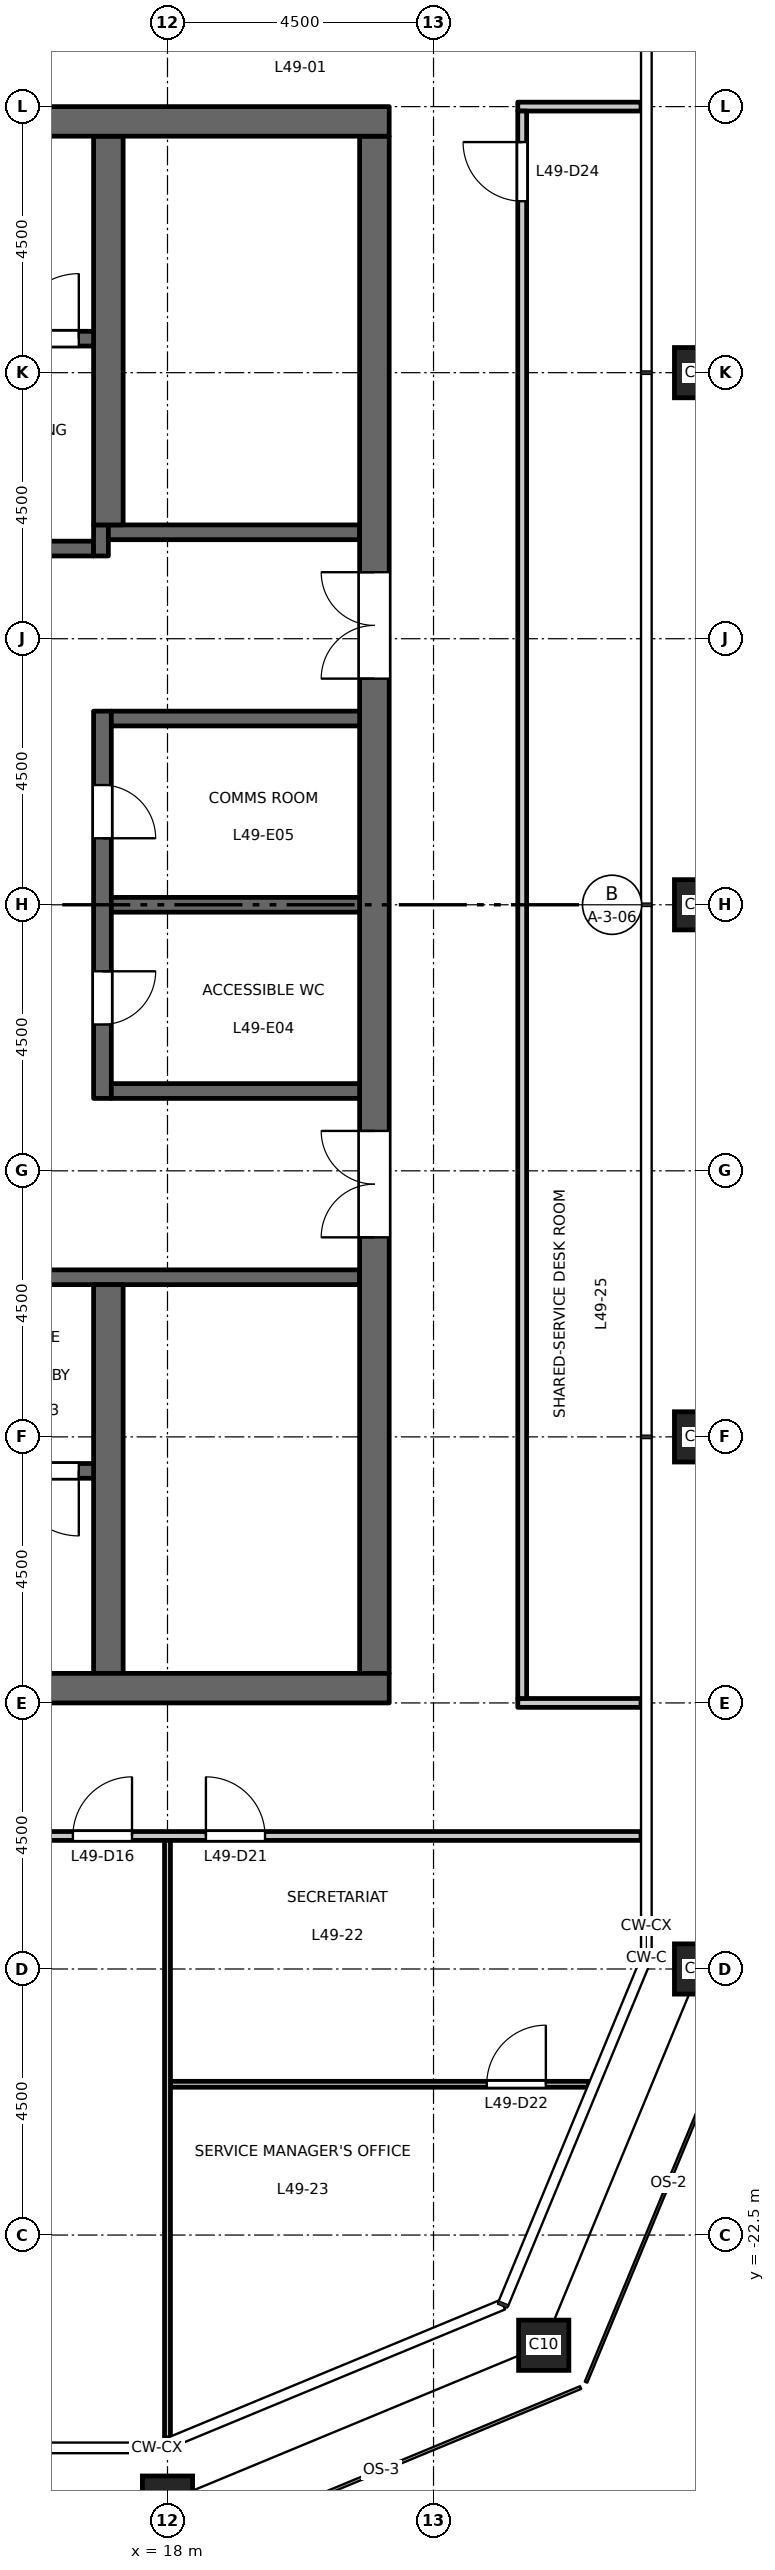
"""IFC4 building model, lengths in metres.
Left out: names, types, materials, properties, quantities, classifications, styles, units other than length and angle.
Written with IfcOpenShell. Run it as: python <this file> out.ifc"""

import sys

from ifc_helpers import new_model, si_unit, direction, frame, frame_2d, origin, origin_2d, place, context, subcontext, project, spatial, rectangle, hollow_rectangle, extrude, element, fill, save


model = new_model("IFC4")
c1 = context("Model", 3, precision=1e-05, world=origin(), true_north=direction((0.0, 1.0)))
c2 = subcontext(c1, "Body", "Model", "MODEL_VIEW")
j1 = project(units=[si_unit("LENGTHUNIT", "METRE"), si_unit("PLANEANGLEUNIT", "RADIAN")], contexts=[c1])
p1 = place(None, origin())
s1 = spatial("IfcSite", under=j1, at=p1, CompositionType="ELEMENT")
p2 = place(p1, origin())
s2 = spatial("IfcBuilding", under=s1, at=p2, CompositionType="ELEMENT")
p3 = place(p2, frame((0.0, 0.0, 228.7)))
s3 = spatial("IfcBuildingStorey", under=s2, at=p3, CompositionType="ELEMENT", Elevation=228.7)
for number, where, z_axis, x_axis in (
    (1, (18.0, -27.0, 0.0), (0.0, 0.0, 1.0), (1.0, 0.0, 0.0)),
    (2, (24.364, -24.364, 0.0), (0.0, 0.0, 1.0), (1.0, 0.0, 0.0)),
    (3, (27.0, -18.0, 0.0), (0.0, 0.0, 1.0), (1.0, 0.0, 0.0)),
    (4, (27.0, -9.0, 0.0), (0.0, 0.0, 1.0), (1.0, 0.0, 0.0)),
    (5, (27.0, 0.0, 0.0), (0.0, 0.0, 1.0), (1.0, 0.0, 0.0)),
    (6, (27.0, 9.0, 0.0), (0.0, 0.0, 1.0), (1.0, 0.0, 0.0)),
):
    element("IfcColumn", number, at=place(p3, frame(where, z_axis=z_axis, x_axis=x_axis)), inside=s3, PredefinedType="COLUMN", context=c2, shape_type="SweptSolid", body=[
        extrude(hollow_rectangle(XDim=0.85, YDim=0.85, WallThickness=0.05, at=origin_2d()), origin(), (0.0, 0.0, 1.0), 4.5),
    ])
p4 = place(p3, frame((12.15, 6.025, 0.0), z_axis=(0.0, 0.0, 1.0), x_axis=(1.0, 0.0, 0.0)))
e7 = element("IfcWall", 7, at=p4, inside=s3, PredefinedType="SHEAR", context=c2, shape_type="SweptSolid", body=[
    extrude(rectangle(XDim=4.6, YDim=0.25, at=frame_2d((2.3, 0.0))), origin(), (0.0, 0.0, 1.0), 4.35),
])
p5 = place(p4, frame((1.8, 0.0, 0.0)))
e8 = element("IfcOpeningElement", 8, at=p5, cuts=e7, PredefinedType="OPENING", context=c2, shape_type="SweptSolid", body=[
    extrude(rectangle(XDim=1.0, YDim=2.1, at=frame_2d((0.5, 1.05))), frame((0.0, 0.135, 0.0), z_axis=(0.0, -1.0, 0.0), x_axis=(1.0, 0.0, 0.0)), (0.0, 0.0, 1.0), 0.27),
])
p6 = place(p3, frame((16.875, 5.9, 0.0), z_axis=(0.0, 0.0, 1.0), x_axis=(0.0, 1.0, 0.0)))
e9 = element("IfcWall", 9, at=p6, inside=s3, PredefinedType="SHEAR", context=c2, shape_type="SweptSolid", body=[
    extrude(rectangle(XDim=0.525, YDim=0.25, at=frame_2d((0.263, 0.0))), origin(), (0.0, 0.0, 1.0), 4.35),
])
p7 = place(p3, frame((17.0, 6.3, 0.0), z_axis=(0.0, 0.0, 1.0), x_axis=(1.0, 0.0, 0.0)))
e10 = element("IfcWall", 10, at=p7, inside=s3, PredefinedType="SHEAR", context=c2, shape_type="SweptSolid", body=[
    extrude(rectangle(XDim=4.25, YDim=0.25, at=frame_2d((2.125, 0.0))), origin(), (0.0, 0.0, 1.0), 4.35),
])
p8 = place(p3, frame((12.15, -6.3, 0.0), z_axis=(0.0, 0.0, 1.0), x_axis=(1.0, 0.0, 0.0)))
e11 = element("IfcWall", 11, at=p8, inside=s3, PredefinedType="SHEAR", context=c2, shape_type="SweptSolid", body=[
    extrude(rectangle(XDim=9.1, YDim=0.25, at=frame_2d((4.55, 0.0))), origin(), (0.0, 0.0, 1.0), 4.35),
])
p9 = place(p8, frame((1.8, 0.0, 0.0)))
e12 = element("IfcOpeningElement", 12, at=p9, cuts=e11, PredefinedType="OPENING", context=c2, shape_type="SweptSolid", body=[
    extrude(rectangle(XDim=1.0, YDim=2.1, at=frame_2d((0.5, 1.05))), frame((0.0, 0.135, 0.0), z_axis=(0.0, -1.0, 0.0), x_axis=(1.0, 0.0, 0.0)), (0.0, 0.0, 1.0), 0.27),
])
p10 = place(p3, frame((21.5, -13.0, 0.0), z_axis=(0.0, 0.0, 1.0), x_axis=(0.0, 1.0, 0.0)))
e13 = element("IfcWall", 13, at=p10, inside=s3, PredefinedType="SHEAR", context=c2, shape_type="SweptSolid", body=[
    extrude(rectangle(XDim=26.0, YDim=0.5, at=frame_2d((13.0, 0.0))), origin(), (0.0, 0.0, 1.0), 4.35),
])
p11 = place(p10, frame((16.825, 0.0, 0.0)))
e14 = element("IfcOpeningElement", 14, at=p11, cuts=e13, PredefinedType="OPENING", context=c2, shape_type="SweptSolid", body=[
    extrude(rectangle(XDim=1.8, YDim=2.1, at=frame_2d((0.9, 1.05))), frame((0.0, 0.26, 0.0), z_axis=(0.0, -1.0, 0.0), x_axis=(1.0, 0.0, 0.0)), (0.0, 0.0, 1.0), 0.52),
])
p12 = place(p10, frame((7.375, 0.0, 0.0)))
e15 = element("IfcOpeningElement", 15, at=p12, cuts=e13, PredefinedType="OPENING", context=c2, shape_type="SweptSolid", body=[
    extrude(rectangle(XDim=1.8, YDim=2.1, at=frame_2d((0.9, 1.05))), frame((0.0, 0.26, 0.0), z_axis=(0.0, -1.0, 0.0), x_axis=(1.0, 0.0, 0.0)), (0.0, 0.0, 1.0), 0.52),
])
p13 = place(p3, frame((16.9, -3.275, 0.0), z_axis=(0.0, 0.0, 1.0), x_axis=(0.0, 1.0, 0.0)))
e16 = element("IfcWall", 16, at=p13, inside=s3, PredefinedType="SHEAR", context=c2, shape_type="SweptSolid", body=[
    extrude(rectangle(XDim=6.55, YDim=0.3, at=frame_2d((3.275, 0.0))), origin(), (0.0, 0.0, 1.0), 4.35),
])
p14 = place(p13, frame((1.25, 0.0, 0.0)))
e17 = element("IfcOpeningElement", 17, at=p14, cuts=e16, PredefinedType="OPENING", context=c2, shape_type="SweptSolid", body=[
    extrude(rectangle(XDim=0.9, YDim=2.1, at=frame_2d((0.45, 1.05))), frame((0.0, 0.16, 0.0), z_axis=(0.0, -1.0, 0.0), x_axis=(1.0, 0.0, 0.0)), (0.0, 0.0, 1.0), 0.32),
])
p15 = place(p13, frame((4.4, 0.0, 0.0)))
e18 = element("IfcOpeningElement", 18, at=p15, cuts=e16, PredefinedType="OPENING", context=c2, shape_type="SweptSolid", body=[
    extrude(rectangle(XDim=0.9, YDim=2.1, at=frame_2d((0.45, 1.05))), frame((0.0, 0.16, 0.0), z_axis=(0.0, -1.0, 0.0), x_axis=(1.0, 0.0, 0.0)), (0.0, 0.0, 1.0), 0.32),
])
for number, where, z_axis, x_axis in (
    (19, (17.05, 0.0, 0.0), (0.0, 0.0, 1.0), (1.0, 0.0, 0.0)),
    (20, (17.05, 3.15, 0.0), (0.0, 0.0, 1.0), (1.0, 0.0, 0.0)),
    (21, (17.05, -3.15, 0.0), (0.0, 0.0, 1.0), (1.0, 0.0, 0.0)),
):
    element("IfcWall", number, at=place(p3, frame(where, z_axis=z_axis, x_axis=x_axis)), inside=s3, PredefinedType="SHEAR", context=c2, shape_type="SweptSolid", body=[
        extrude(rectangle(XDim=4.2, YDim=0.25, at=frame_2d((2.1, 0.0))), origin(), (0.0, 0.0, 1.0), 4.35),
    ])
for number, where, z_axis, x_axis in (
    (22, (17.0, 6.425, 0.0), (0.0, 0.0, 1.0), (0.0, 1.0, 0.0)),
    (23, (17.0, -13.0, 0.0), (0.0, 0.0, 1.0), (0.0, 1.0, 0.0)),
):
    element("IfcWall", number, at=place(p3, frame(where, z_axis=z_axis, x_axis=x_axis)), inside=s3, PredefinedType="SHEAR", context=c2, shape_type="SweptSolid", body=[
        extrude(rectangle(XDim=6.575, YDim=0.5, at=frame_2d((3.288, 0.0))), origin(), (0.0, 0.0, 1.0), 4.35),
    ])
p16 = place(p3, frame((8.75, 9.575, 0.0), z_axis=(0.0, 0.0, 1.0), x_axis=(1.0, 0.0, 0.0)))
e24 = element("IfcWall", 24, at=p16, inside=s3, PredefinedType="SHEAR", context=c2, shape_type="SweptSolid", body=[
    extrude(rectangle(XDim=8.0, YDim=0.25, at=frame_2d((4.0, 0.0))), origin(), (0.0, 0.0, 1.0), 4.35),
])
p17 = place(p16, frame((6.65, 0.0, 0.0)))
e25 = element("IfcOpeningElement", 25, at=p17, cuts=e24, PredefinedType="OPENING", context=c2, shape_type="SweptSolid", body=[
    extrude(rectangle(XDim=1.1, YDim=2.1, at=frame_2d((0.55, 1.05))), frame((0.0, 0.135, 0.0), z_axis=(0.0, -1.0, 0.0), x_axis=(1.0, 0.0, 0.0)), (0.0, 0.0, 1.0), 0.27),
])
p18 = place(p3, frame((8.75, -9.575, 0.0), z_axis=(0.0, 0.0, 1.0), x_axis=(1.0, 0.0, 0.0)))
e26 = element("IfcWall", 26, at=p18, inside=s3, PredefinedType="SHEAR", context=c2, shape_type="SweptSolid", body=[
    extrude(rectangle(XDim=8.0, YDim=0.25, at=frame_2d((4.0, 0.0))), origin(), (0.0, 0.0, 1.0), 4.35),
])
p19 = place(p18, frame((6.65, 0.0, 0.0)))
e27 = element("IfcOpeningElement", 27, at=p19, cuts=e26, PredefinedType="OPENING", context=c2, shape_type="SweptSolid", body=[
    extrude(rectangle(XDim=1.1, YDim=2.1, at=frame_2d((0.55, 1.05))), frame((0.0, 0.135, 0.0), z_axis=(0.0, -1.0, 0.0), x_axis=(1.0, 0.0, 0.0)), (0.0, 0.0, 1.0), 0.27),
])
for number, where, z_axis, x_axis in (
    (28, (8.25, 13.25, 0.0), (0.0, 0.0, 1.0), (1.0, 0.0, 0.0)),
    (29, (8.25, -13.25, 0.0), (0.0, 0.0, 1.0), (1.0, 0.0, 0.0)),
):
    element("IfcWall", number, at=place(p3, frame(where, z_axis=z_axis, x_axis=x_axis)), inside=s3, PredefinedType="SHEAR", context=c2, shape_type="SweptSolid", body=[
        extrude(rectangle(XDim=13.5, YDim=0.5, at=frame_2d((6.75, 0.0))), origin(), (0.0, 0.0, 1.0), 4.35),
    ])
p20 = place(p3, frame((18.05, -19.95, 0.0), z_axis=(0.0, 0.0, 1.0), x_axis=(1.0, 0.0, 0.0)))
e30 = element("IfcWall", 30, at=p20, inside=s3, PredefinedType="PARTITIONING", context=c2, shape_type="SweptSolid", body=[
    extrude(rectangle(XDim=7.071, YDim=0.1, at=frame_2d((3.536, 0.0))), origin(), (0.0, 0.0, 1.0), 4.35),
])
p21 = place(p20, frame((5.35, 0.0, 0.0)))
e31 = element("IfcOpeningElement", 31, at=p21, cuts=e30, PredefinedType="OPENING", context=c2, shape_type="SweptSolid", body=[
    extrude(rectangle(XDim=1.0, YDim=2.1, at=frame_2d((0.5, 1.05))), frame((0.0, 0.06, 0.0), z_axis=(0.0, -1.0, 0.0), x_axis=(1.0, 0.0, 0.0)), (0.0, 0.0, 1.0), 0.12),
])
p22 = place(p3, frame((-26.01, -15.75, 0.0), z_axis=(0.0, 0.0, 1.0), x_axis=(1.0, 0.0, 0.0)))
e32 = element("IfcWall", 32, at=p22, inside=s3, PredefinedType="PARTITIONING", context=c2, shape_type="SweptSolid", body=[
    extrude(rectangle(XDim=52.02, YDim=0.15, at=frame_2d((26.01, 0.0))), origin(), (0.0, 0.0, 1.0), 4.35),
])
p23 = place(p22, frame((8.66, 0.0, 0.0)))
e33 = element("IfcOpeningElement", 33, at=p23, cuts=e32, PredefinedType="OPENING", context=c2, shape_type="SweptSolid", body=[
    extrude(rectangle(XDim=1.0, YDim=2.1, at=frame_2d((0.5, 1.05))), frame((0.0, 0.085, 0.0), z_axis=(0.0, -1.0, 0.0), x_axis=(1.0, 0.0, 0.0)), (0.0, 0.0, 1.0), 0.17),
])
p24 = place(p22, frame((15.41, 0.0, 0.0)))
e34 = element("IfcOpeningElement", 34, at=p24, cuts=e32, PredefinedType="OPENING", context=c2, shape_type="SweptSolid", body=[
    extrude(rectangle(XDim=1.0, YDim=2.1, at=frame_2d((0.5, 1.05))), frame((0.0, 0.085, 0.0), z_axis=(0.0, -1.0, 0.0), x_axis=(1.0, 0.0, 0.0)), (0.0, 0.0, 1.0), 0.17),
])
p25 = place(p22, frame((24.41, 0.0, 0.0)))
e35 = element("IfcOpeningElement", 35, at=p25, cuts=e32, PredefinedType="OPENING", context=c2, shape_type="SweptSolid", body=[
    extrude(rectangle(XDim=1.0, YDim=2.1, at=frame_2d((0.5, 1.05))), frame((0.0, 0.085, 0.0), z_axis=(0.0, -1.0, 0.0), x_axis=(1.0, 0.0, 0.0)), (0.0, 0.0, 1.0), 0.17),
])
p26 = place(p22, frame((33.41, 0.0, 0.0)))
e36 = element("IfcOpeningElement", 36, at=p26, cuts=e32, PredefinedType="OPENING", context=c2, shape_type="SweptSolid", body=[
    extrude(rectangle(XDim=1.0, YDim=2.1, at=frame_2d((0.5, 1.05))), frame((0.0, 0.085, 0.0), z_axis=(0.0, -1.0, 0.0), x_axis=(1.0, 0.0, 0.0)), (0.0, 0.0, 1.0), 0.17),
])
p27 = place(p22, frame((42.41, 0.0, 0.0)))
e37 = element("IfcOpeningElement", 37, at=p27, cuts=e32, PredefinedType="OPENING", context=c2, shape_type="SweptSolid", body=[
    extrude(rectangle(XDim=1.0, YDim=2.1, at=frame_2d((0.5, 1.05))), frame((0.0, 0.085, 0.0), z_axis=(0.0, -1.0, 0.0), x_axis=(1.0, 0.0, 0.0)), (0.0, 0.0, 1.0), 0.17),
])
p28 = place(p22, frame((6.4, 0.0, 0.0)))
e38 = element("IfcOpeningElement", 38, at=p28, cuts=e32, PredefinedType="OPENING", context=c2, shape_type="SweptSolid", body=[
    extrude(rectangle(XDim=1.0, YDim=2.1, at=frame_2d((0.5, 1.05))), frame((0.0, 0.085, 0.0), z_axis=(0.0, -1.0, 0.0), x_axis=(1.0, 0.0, 0.0)), (0.0, 0.0, 1.0), 0.17),
])
p29 = place(p22, frame((44.66, 0.0, 0.0)))
e39 = element("IfcOpeningElement", 39, at=p29, cuts=e32, PredefinedType="OPENING", context=c2, shape_type="SweptSolid", body=[
    extrude(rectangle(XDim=1.0, YDim=2.1, at=frame_2d((0.5, 1.05))), frame((0.0, 0.085, 0.0), z_axis=(0.0, -1.0, 0.0), x_axis=(1.0, 0.0, 0.0)), (0.0, 0.0, 1.0), 0.17),
])
p30 = place(p3, frame((23.925, -13.5, 0.0), z_axis=(0.0, 0.0, 1.0), x_axis=(1.0, 0.0, 0.0)))
e40 = element("IfcWall", 40, at=p30, inside=s3, PredefinedType="PARTITIONING", context=c2, shape_type="SweptSolid", body=[
    extrude(rectangle(XDim=2.085, YDim=0.15, at=frame_2d((1.042, 0.0))), origin(), (0.0, 0.0, 1.0), 3.95),
])
p31 = place(p3, frame((23.925, 13.5, 0.0), z_axis=(0.0, 0.0, 1.0), x_axis=(1.0, 0.0, 0.0)))
e41 = element("IfcWall", 41, at=p31, inside=s3, PredefinedType="PARTITIONING", context=c2, shape_type="SweptSolid", body=[
    extrude(rectangle(XDim=2.085, YDim=0.15, at=frame_2d((1.042, 0.0))), origin(), (0.0, 0.0, 1.0), 4.35),
])
p32 = place(p3, frame((18.0, -25.928, 0.0), z_axis=(0.0, 0.0, 1.0), x_axis=(0.0, 1.0, 0.0)))
e42 = element("IfcWall", 42, at=p32, inside=s3, PredefinedType="PARTITIONING", context=c2, shape_type="SweptSolid", body=[
    extrude(rectangle(XDim=10.103, YDim=0.1, at=frame_2d((5.052, 0.0))), origin(), (0.0, 0.0, 1.0), 3.65),
])
p33 = place(p3, frame((24.0, -13.425, 0.0), z_axis=(0.0, 0.0, 1.0), x_axis=(0.0, 1.0, 0.0)))
e43 = element("IfcWall", 43, at=p33, inside=s3, PredefinedType="PARTITIONING", context=c2, shape_type="SweptSolid", body=[
    extrude(rectangle(XDim=26.85, YDim=0.15, at=frame_2d((13.425, 0.0))), origin(), (0.0, 0.0, 1.0), 4.35),
])
p34 = place(p33, frame((25.325, 0.0, 0.0)))
e44 = element("IfcOpeningElement", 44, at=p34, cuts=e43, PredefinedType="OPENING", context=c2, shape_type="SweptSolid", body=[
    extrude(rectangle(XDim=1.0, YDim=2.1, at=frame_2d((0.5, 1.05))), frame((0.0, 0.085, 0.0), z_axis=(0.0, -1.0, 0.0), x_axis=(1.0, 0.0, 0.0)), (0.0, 0.0, 1.0), 0.17),
])
p35 = place(p17, origin())
e45 = element("IfcDoor", 45, at=p35, inside=s3, OperationType="SINGLE_SWING_LEFT", PredefinedType="DOOR", context=c2, shape_type="SweptSolid", body=[
    extrude(rectangle(XDim=1.1, YDim=2.1, at=frame_2d((0.55, 1.05))), frame((0.0, 0.025, 0.0), z_axis=(0.0, -1.0, 0.0), x_axis=(1.0, 0.0, 0.0)), (0.0, 0.0, 1.0), 0.05),
])
fill(e25, e45)
p36 = place(p19, origin())
e46 = element("IfcDoor", 46, at=p36, inside=s3, OperationType="SINGLE_SWING_RIGHT", PredefinedType="DOOR", context=c2, shape_type="SweptSolid", body=[
    extrude(rectangle(XDim=1.1, YDim=2.1, at=frame_2d((0.55, 1.05))), frame((0.0, 0.025, 0.0), z_axis=(0.0, -1.0, 0.0), x_axis=(1.0, 0.0, 0.0)), (0.0, 0.0, 1.0), 0.05),
])
fill(e27, e46)
p37 = place(p11, origin())
e47 = element("IfcDoor", 47, at=p37, inside=s3, OperationType="DOUBLE_DOOR_DOUBLE_SWING", PredefinedType="DOOR", context=c2, shape_type="SweptSolid", body=[
    extrude(rectangle(XDim=1.8, YDim=2.1, at=frame_2d((0.9, 1.05))), frame((0.0, 0.025, 0.0), z_axis=(0.0, -1.0, 0.0), x_axis=(1.0, 0.0, 0.0)), (0.0, 0.0, 1.0), 0.05),
])
fill(e14, e47)
p38 = place(p12, origin())
e48 = element("IfcDoor", 48, at=p38, inside=s3, OperationType="DOUBLE_DOOR_DOUBLE_SWING", PredefinedType="DOOR", context=c2, shape_type="SweptSolid", body=[
    extrude(rectangle(XDim=1.8, YDim=2.1, at=frame_2d((0.9, 1.05))), frame((0.0, 0.025, 0.0), z_axis=(0.0, -1.0, 0.0), x_axis=(1.0, 0.0, 0.0)), (0.0, 0.0, 1.0), 0.05),
])
fill(e15, e48)
p39 = place(p14, origin())
e49 = element("IfcDoor", 49, at=p39, inside=s3, OperationType="SINGLE_SWING_RIGHT", PredefinedType="DOOR", context=c2, shape_type="SweptSolid", body=[
    extrude(rectangle(XDim=0.9, YDim=2.1, at=frame_2d((0.45, 1.05))), frame((0.0, 0.025, 0.0), z_axis=(0.0, -1.0, 0.0), x_axis=(1.0, 0.0, 0.0)), (0.0, 0.0, 1.0), 0.05),
])
fill(e17, e49)
p40 = place(p15, origin())
e50 = element("IfcDoor", 50, at=p40, inside=s3, OperationType="SINGLE_SWING_LEFT", PredefinedType="DOOR", context=c2, shape_type="SweptSolid", body=[
    extrude(rectangle(XDim=0.9, YDim=2.1, at=frame_2d((0.45, 1.05))), frame((0.0, 0.025, 0.0), z_axis=(0.0, -1.0, 0.0), x_axis=(1.0, 0.0, 0.0)), (0.0, 0.0, 1.0), 0.05),
])
fill(e18, e50)
p41 = place(p27, origin())
e51 = element("IfcDoor", 51, at=p41, inside=s3, OperationType="SINGLE_SWING_RIGHT", PredefinedType="DOOR", context=c2, shape_type="SweptSolid", body=[
    extrude(rectangle(XDim=1.0, YDim=2.1, at=frame_2d((0.5, 1.05))), frame((0.0, 0.025, 0.0), z_axis=(0.0, -1.0, 0.0), x_axis=(1.0, 0.0, 0.0)), (0.0, 0.0, 1.0), 0.05),
])
fill(e37, e51)
p42 = place(p29, origin())
e52 = element("IfcDoor", 52, at=p42, inside=s3, OperationType="SINGLE_SWING_LEFT", PredefinedType="DOOR", context=c2, shape_type="SweptSolid", body=[
    extrude(rectangle(XDim=1.0, YDim=2.1, at=frame_2d((0.5, 1.05))), frame((0.0, 0.025, 0.0), z_axis=(0.0, -1.0, 0.0), x_axis=(1.0, 0.0, 0.0)), (0.0, 0.0, 1.0), 0.05),
])
fill(e39, e52)
p43 = place(p21, origin())
e53 = element("IfcDoor", 53, at=p43, inside=s3, OperationType="SINGLE_SWING_RIGHT", PredefinedType="DOOR", context=c2, shape_type="SweptSolid", body=[
    extrude(rectangle(XDim=1.0, YDim=2.1, at=frame_2d((0.5, 1.05))), frame((0.0, 0.025, 0.0), z_axis=(0.0, -1.0, 0.0), x_axis=(1.0, 0.0, 0.0)), (0.0, 0.0, 1.0), 0.05),
])
fill(e31, e53)
p44 = place(p34, origin())
e54 = element("IfcDoor", 54, at=p44, inside=s3, OperationType="SINGLE_SWING_RIGHT", PredefinedType="DOOR", context=c2, shape_type="SweptSolid", body=[
    extrude(rectangle(XDim=1.0, YDim=2.1, at=frame_2d((0.5, 1.05))), frame((0.0, 0.025, 0.0), z_axis=(0.0, -1.0, 0.0), x_axis=(1.0, 0.0, 0.0)), (0.0, 0.0, 1.0), 0.05),
])
fill(e44, e54)
save(model, sys.argv[1])
